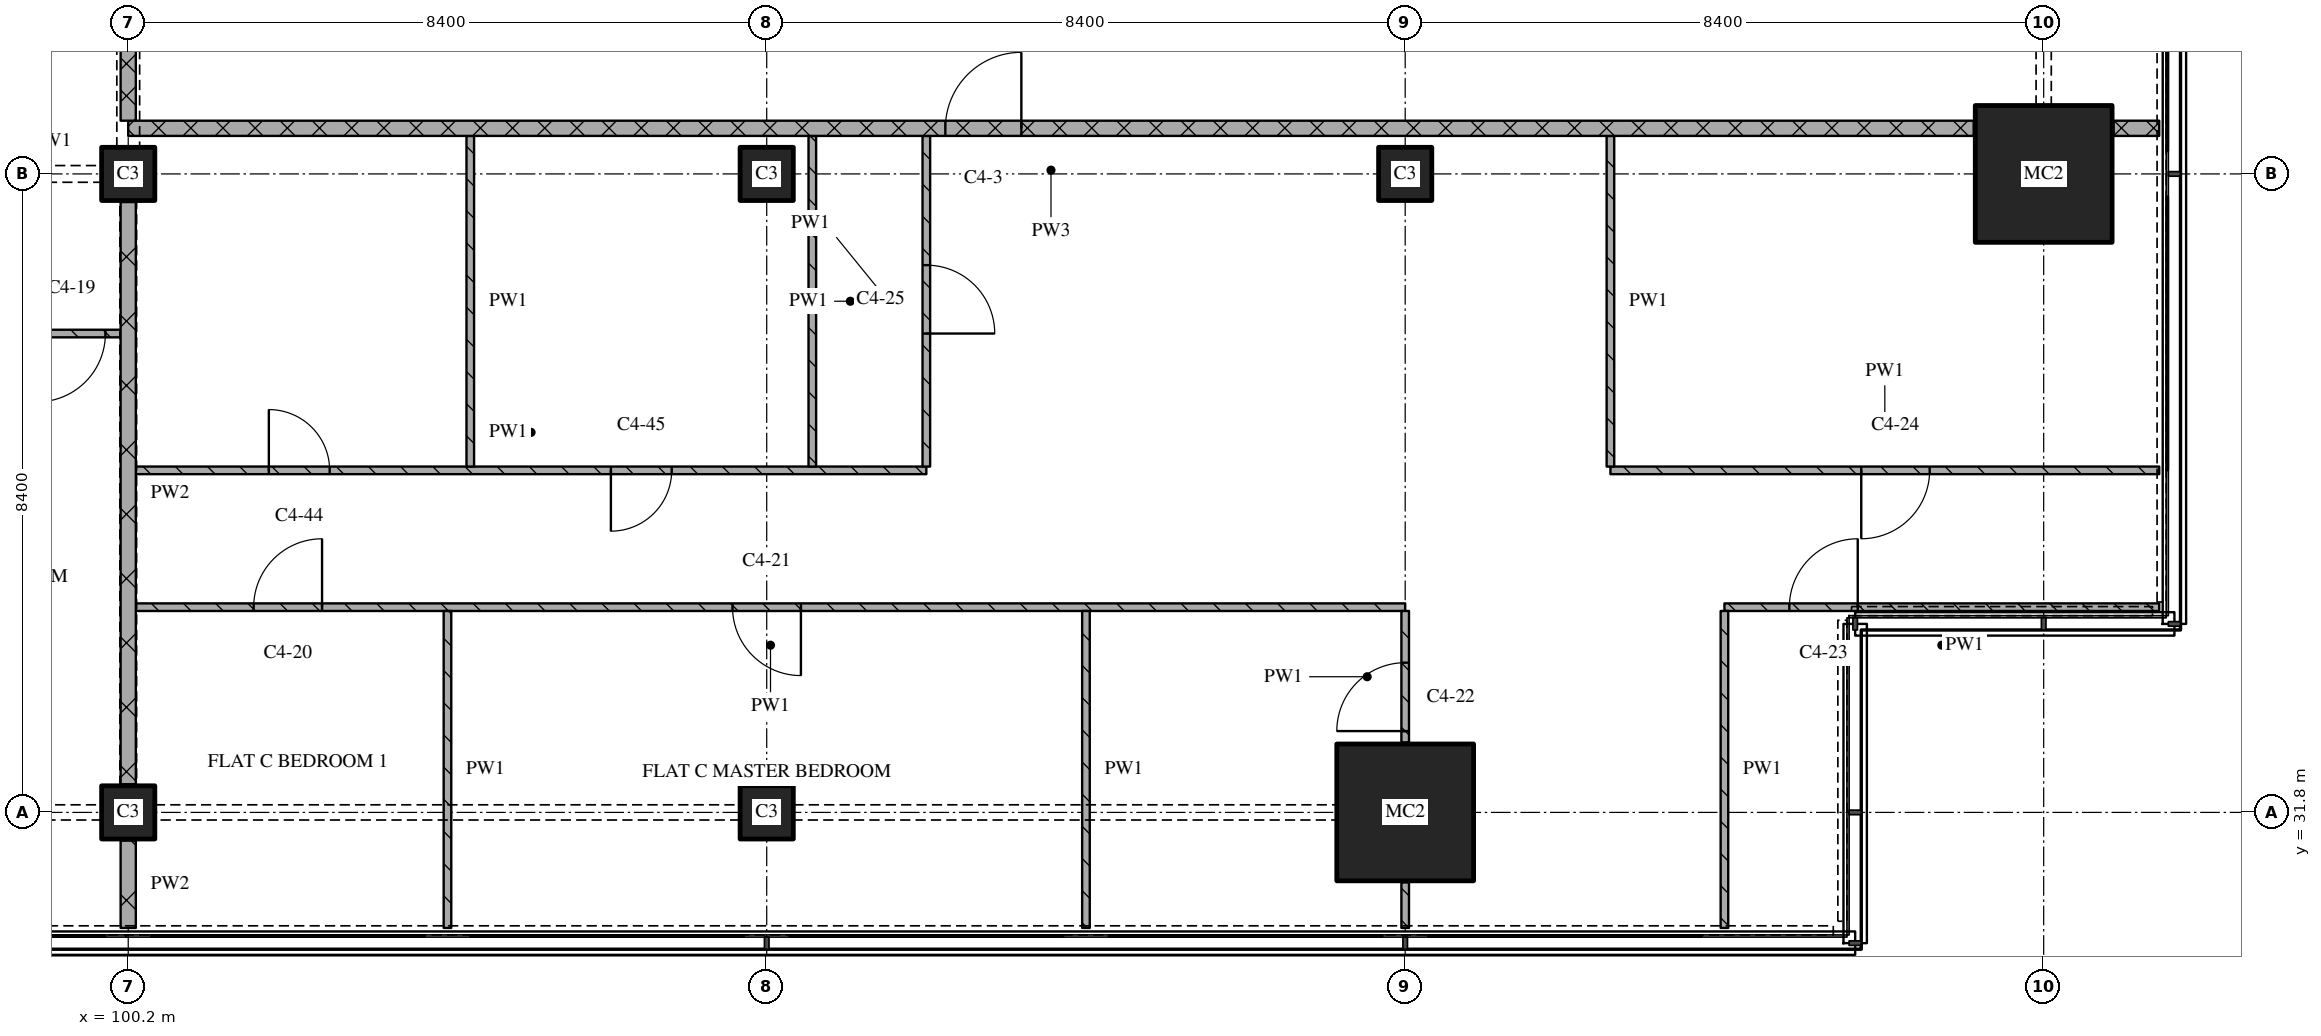
"""IFC4 building model, lengths in metres.
Left out: names, types, materials, properties, quantities, classifications, styles, units other than length and angle.
Written with IfcOpenShell. Run it as: python <this file> out.ifc"""

import sys

from ifc_helpers import new_model, si_unit, direction, frame, frame_2d, origin, origin_2d, place, context, subcontext, project, spatial, rectangle, extrude, element, fill, save


model = new_model("IFC4")
c1 = context("Model", 3, precision=1e-05, world=origin(), true_north=direction((0.0, 1.0)))
c2 = subcontext(c1, "Body", "Model", "MODEL_VIEW")
j1 = project(units=[si_unit("LENGTHUNIT", "METRE"), si_unit("PLANEANGLEUNIT", "RADIAN")], contexts=[c1])
p1 = place(None, origin())
s1 = spatial("IfcSite", under=j1, at=p1, CompositionType="ELEMENT")
p2 = place(p1, origin())
s2 = spatial("IfcBuilding", under=s1, at=p2, CompositionType="ELEMENT")
p3 = place(p2, frame((0.0, 0.0, 187.05)))
s3 = spatial("IfcBuildingStorey", under=s2, at=p3, CompositionType="ELEMENT", Elevation=187.05)
for number, where, z_axis, x_axis in (
    (1, (100.2, 31.8, 0.0), (0.0, 0.0, 1.0), (1.0, 0.0, 0.0)),
    (2, (100.2, 40.2, 0.0), (0.0, 0.0, 1.0), (1.0, 0.0, 0.0)),
    (3, (108.6, 31.8, 0.0), (0.0, 0.0, 1.0), (1.0, 0.0, 0.0)),
    (4, (108.6, 40.2, 0.0), (0.0, 0.0, 1.0), (1.0, 0.0, 0.0)),
):
    element("IfcColumn", number, at=place(p3, frame(where, z_axis=z_axis, x_axis=x_axis)), inside=s3, PredefinedType="COLUMN", context=c2, shape_type="SweptSolid", body=[
        extrude(rectangle(XDim=0.7, YDim=0.7, at=origin_2d()), origin(), (0.0, 0.0, 1.0), 3.6),
    ])
p4 = place(p3, frame((117.0, 31.8, 0.0), z_axis=(0.0, 0.0, 1.0), x_axis=(1.0, 0.0, 0.0)))
e5 = element("IfcColumn", 5, at=p4, inside=s3, PredefinedType="COLUMN", context=c2, shape_type="SweptSolid", body=[
    extrude(rectangle(XDim=1.8, YDim=1.8, at=origin_2d()), origin(), (0.0, 0.0, 1.0), 3.6),
])
p5 = place(p3, frame((117.0, 40.2, 0.0), z_axis=(0.0, 0.0, 1.0), x_axis=(1.0, 0.0, 0.0)))
e6 = element("IfcColumn", 6, at=p5, inside=s3, PredefinedType="COLUMN", context=c2, shape_type="SweptSolid", body=[
    extrude(rectangle(XDim=0.7, YDim=0.7, at=origin_2d()), origin(), (0.0, 0.0, 1.0), 3.6),
])
p6 = place(p3, frame((125.4, 40.2, 0.0), z_axis=(0.0, 0.0, 1.0), x_axis=(1.0, 0.0, 0.0)))
e7 = element("IfcColumn", 7, at=p6, inside=s3, PredefinedType="COLUMN", context=c2, shape_type="SweptSolid", body=[
    extrude(rectangle(XDim=1.8, YDim=1.8, at=origin_2d()), origin(), (0.0, 0.0, 1.0), 3.6),
])
p7 = place(p3, frame((117.0, 34.5, 0.0), z_axis=(0.0, 0.0, 1.0), x_axis=(-1.0, 0.0, 0.0)))
e8 = element("IfcWall", 8, at=p7, inside=s3, PredefinedType="PARTITIONING", context=c2, shape_type="SweptSolid", body=[
    extrude(rectangle(XDim=16.7, YDim=0.1, at=frame_2d((8.35, 0.0))), origin(), (0.0, 0.0, 1.0), 3.32),
])
p8 = place(p7, frame((7.95, 0.0, 0.0)))
e9 = element("IfcOpeningElement", 9, at=p8, cuts=e8, PredefinedType="OPENING", context=c2, shape_type="SweptSolid", body=[
    extrude(rectangle(XDim=0.9, YDim=2.1, at=frame_2d((0.45, 1.05))), frame((0.0, 0.06, 0.0), z_axis=(0.0, -1.0, 0.0), x_axis=(1.0, 0.0, 0.0)), (0.0, 0.0, 1.0), 0.12),
])
p9 = place(p7, frame((14.25, 0.0, 0.0)))
e10 = element("IfcOpeningElement", 10, at=p9, cuts=e8, PredefinedType="OPENING", context=c2, shape_type="SweptSolid", body=[
    extrude(rectangle(XDim=0.9, YDim=2.1, at=frame_2d((0.45, 1.05))), frame((0.0, 0.06, 0.0), z_axis=(0.0, -1.0, 0.0), x_axis=(1.0, 0.0, 0.0)), (0.0, 0.0, 1.0), 0.12),
])
p10 = place(p3, frame((126.92, 34.5, 0.0), z_axis=(0.0, 0.0, 1.0), x_axis=(-1.0, 0.0, 0.0)))
e11 = element("IfcWall", 11, at=p10, inside=s3, PredefinedType="PARTITIONING", context=c2, shape_type="SweptSolid", body=[
    extrude(rectangle(XDim=5.72, YDim=0.1, at=frame_2d((2.86, 0.0))), origin(), (0.0, 0.0, 1.0), 3.32),
])
p11 = place(p10, frame((3.966, 0.0, 0.0)))
e12 = element("IfcOpeningElement", 12, at=p11, cuts=e11, PredefinedType="OPENING", context=c2, shape_type="SweptSolid", body=[
    extrude(rectangle(XDim=0.9, YDim=2.1, at=frame_2d((0.45, 1.05))), frame((0.0, 0.06, 0.0), z_axis=(0.0, -1.0, 0.0), x_axis=(1.0, 0.0, 0.0)), (0.0, 0.0, 1.0), 0.12),
])
p12 = place(p3, frame((100.3, 36.3, 0.0), z_axis=(0.0, 0.0, 1.0), x_axis=(1.0, 0.0, 0.0)))
e13 = element("IfcWall", 13, at=p12, inside=s3, PredefinedType="PARTITIONING", context=c2, shape_type="SweptSolid", body=[
    extrude(rectangle(XDim=10.4, YDim=0.1, at=frame_2d((5.2, 0.0))), origin(), (0.0, 0.0, 1.0), 3.32),
])
p13 = place(p12, frame((1.75, 0.0, 0.0)))
e14 = element("IfcOpeningElement", 14, at=p13, cuts=e13, PredefinedType="OPENING", context=c2, shape_type="SweptSolid", body=[
    extrude(rectangle(XDim=0.8, YDim=2.1, at=frame_2d((0.4, 1.05))), frame((0.0, 0.06, 0.0), z_axis=(0.0, -1.0, 0.0), x_axis=(1.0, 0.0, 0.0)), (0.0, 0.0, 1.0), 0.12),
])
p14 = place(p12, frame((6.25, 0.0, 0.0)))
e15 = element("IfcOpeningElement", 15, at=p14, cuts=e13, PredefinedType="OPENING", context=c2, shape_type="SweptSolid", body=[
    extrude(rectangle(XDim=0.8, YDim=2.1, at=frame_2d((0.4, 1.05))), frame((0.0, 0.06, 0.0), z_axis=(0.0, -1.0, 0.0), x_axis=(1.0, 0.0, 0.0)), (0.0, 0.0, 1.0), 0.12),
])
p15 = place(p3, frame((119.7, 36.3, 0.0), z_axis=(0.0, 0.0, 1.0), x_axis=(1.0, 0.0, 0.0)))
e16 = element("IfcWall", 16, at=p15, inside=s3, PredefinedType="PARTITIONING", context=c2, shape_type="SweptSolid", body=[
    extrude(rectangle(XDim=7.22, YDim=0.1, at=frame_2d((3.61, 0.0))), origin(), (0.0, 0.0, 1.0), 3.32),
])
p16 = place(p15, frame((3.3, 0.0, 0.0)))
e17 = element("IfcOpeningElement", 17, at=p16, cuts=e16, PredefinedType="OPENING", context=c2, shape_type="SweptSolid", body=[
    extrude(rectangle(XDim=0.9, YDim=2.1, at=frame_2d((0.45, 1.05))), frame((0.0, 0.06, 0.0), z_axis=(0.0, -1.0, 0.0), x_axis=(1.0, 0.0, 0.0)), (0.0, 0.0, 1.0), 0.12),
])
p17 = place(p3, frame((89.7, 38.1, 0.0), z_axis=(0.0, 0.0, 1.0), x_axis=(1.0, 0.0, 0.0)))
e18 = element("IfcWall", 18, at=p17, inside=s3, PredefinedType="PARTITIONING", context=c2, shape_type="SweptSolid", body=[
    extrude(rectangle(XDim=10.4, YDim=0.1, at=frame_2d((5.2, 0.0))), origin(), (0.0, 0.0, 1.0), 3.32),
])
p18 = place(p17, frame((6.35, 0.0, 0.0)))
e19 = element("IfcOpeningElement", 19, at=p18, cuts=e18, PredefinedType="OPENING", context=c2, shape_type="SweptSolid", body=[
    extrude(rectangle(XDim=0.8, YDim=2.1, at=frame_2d((0.4, 1.05))), frame((0.0, 0.06, 0.0), z_axis=(0.0, -1.0, 0.0), x_axis=(1.0, 0.0, 0.0)), (0.0, 0.0, 1.0), 0.12),
])
p19 = place(p17, frame((9.3, 0.0, 0.0)))
e20 = element("IfcOpeningElement", 20, at=p19, cuts=e18, PredefinedType="OPENING", context=c2, shape_type="SweptSolid", body=[
    extrude(rectangle(XDim=0.9, YDim=2.1, at=frame_2d((0.45, 1.05))), frame((0.0, 0.06, 0.0), z_axis=(0.0, -1.0, 0.0), x_axis=(1.0, 0.0, 0.0)), (0.0, 0.0, 1.0), 0.12),
])
p20 = place(p3, frame((124.48, 40.8, 0.0), z_axis=(0.0, 0.0, 1.0), x_axis=(-1.0, 0.0, 0.0)))
e21 = element("IfcWall", 21, at=p20, inside=s3, PredefinedType="PARTITIONING", context=c2, shape_type="SweptSolid", body=[
    extrude(rectangle(XDim=24.28, YDim=0.2, at=frame_2d((12.14, 0.0))), origin(), (0.0, 0.0, 1.0), 3.32),
])
p21 = place(p20, frame((12.53, 0.0, 0.0)))
e22 = element("IfcOpeningElement", 22, at=p21, cuts=e21, PredefinedType="OPENING", context=c2, shape_type="SweptSolid", body=[
    extrude(rectangle(XDim=1.0, YDim=2.1, at=frame_2d((0.5, 1.05))), frame((0.0, 0.11, 0.0), z_axis=(0.0, -1.0, 0.0), x_axis=(1.0, 0.0, 0.0)), (0.0, 0.0, 1.0), 0.22),
])
p22 = place(p3, frame((126.32, 40.8, 0.0), z_axis=(0.0, 0.0, 1.0), x_axis=(1.0, 0.0, 0.0)))
e23 = element("IfcWall", 23, at=p22, inside=s3, PredefinedType="PARTITIONING", context=c2, shape_type="SweptSolid", body=[
    extrude(rectangle(XDim=0.6, YDim=0.2, at=frame_2d((0.3, 0.0))), origin(), (0.0, 0.0, 1.0), 3.32),
])
p23 = place(p3, frame((100.2, 43.1, 0.0), z_axis=(0.0, 0.0, 1.0), x_axis=(0.0, -1.0, 0.0)))
e24 = element("IfcWall", 24, at=p23, inside=s3, PredefinedType="PARTITIONING", context=c2, shape_type="SweptSolid", body=[
    extrude(rectangle(XDim=2.2, YDim=0.2, at=frame_2d((1.1, 0.0))), origin(), (0.0, 0.0, 1.0), 2.43),
])
p24 = place(p3, frame((100.2, 31.43, 0.0), z_axis=(0.0, 0.0, 1.0), x_axis=(0.0, -1.0, 0.0)))
e25 = element("IfcWall", 25, at=p24, inside=s3, PredefinedType="PARTITIONING", context=c2, shape_type="SweptSolid", body=[
    extrude(rectangle(XDim=1.15, YDim=0.2, at=frame_2d((0.575, 0.0))), origin(), (0.0, 0.0, 1.0), 3.32),
])
p25 = place(p3, frame((100.2, 39.83, 0.0), z_axis=(0.0, 0.0, 1.0), x_axis=(0.0, -1.0, 0.0)))
e26 = element("IfcWall", 26, at=p25, inside=s3, PredefinedType="PARTITIONING", context=c2, shape_type="SweptSolid", body=[
    extrude(rectangle(XDim=7.66, YDim=0.2, at=frame_2d((3.83, 0.0))), origin(), (0.0, 0.0, 1.0), 2.72),
])
p26 = place(p3, frame((104.4, 34.45, 0.0), z_axis=(0.0, 0.0, 1.0), x_axis=(0.0, -1.0, 0.0)))
e27 = element("IfcWall", 27, at=p26, inside=s3, PredefinedType="PARTITIONING", context=c2, shape_type="SweptSolid", body=[
    extrude(rectangle(XDim=4.17, YDim=0.1, at=frame_2d((2.085, 0.0))), origin(), (0.0, 0.0, 1.0), 3.32),
])
for number, where, z_axis, x_axis in (
    (28, (104.7, 40.7, 0.0), (0.0, 0.0, 1.0), (0.0, -1.0, 0.0)),
    (29, (109.2, 40.7, 0.0), (0.0, 0.0, 1.0), (0.0, -1.0, 0.0)),
):
    element("IfcWall", number, at=place(p3, frame(where, z_axis=z_axis, x_axis=x_axis)), inside=s3, PredefinedType="PARTITIONING", context=c2, shape_type="SweptSolid", body=[
        extrude(rectangle(XDim=4.35, YDim=0.1, at=frame_2d((2.175, 0.0))), origin(), (0.0, 0.0, 1.0), 3.32),
    ])
p27 = place(p3, frame((110.7, 36.35, 0.0), z_axis=(0.0, 0.0, 1.0), x_axis=(0.0, 1.0, 0.0)))
e30 = element("IfcWall", 30, at=p27, inside=s3, PredefinedType="PARTITIONING", context=c2, shape_type="SweptSolid", body=[
    extrude(rectangle(XDim=4.35, YDim=0.1, at=frame_2d((2.175, 0.0))), origin(), (0.0, 0.0, 1.0), 3.32),
])
p28 = place(p27, frame((1.75, 0.0, 0.0)))
e31 = element("IfcOpeningElement", 31, at=p28, cuts=e30, PredefinedType="OPENING", context=c2, shape_type="SweptSolid", body=[
    extrude(rectangle(XDim=0.9, YDim=2.1, at=frame_2d((0.45, 1.05))), frame((0.0, 0.06, 0.0), z_axis=(0.0, -1.0, 0.0), x_axis=(1.0, 0.0, 0.0)), (0.0, 0.0, 1.0), 0.12),
])
p29 = place(p3, frame((112.8, 34.45, 0.0), z_axis=(0.0, 0.0, 1.0), x_axis=(0.0, -1.0, 0.0)))
e32 = element("IfcWall", 32, at=p29, inside=s3, PredefinedType="PARTITIONING", context=c2, shape_type="SweptSolid", body=[
    extrude(rectangle(XDim=4.17, YDim=0.1, at=frame_2d((2.085, 0.0))), origin(), (0.0, 0.0, 1.0), 3.32),
])
p30 = place(p3, frame((117.0, 30.88, 0.0), z_axis=(0.0, 0.0, 1.0), x_axis=(0.0, -1.0, 0.0)))
e33 = element("IfcWall", 33, at=p30, inside=s3, PredefinedType="PARTITIONING", context=c2, shape_type="SweptSolid", body=[
    extrude(rectangle(XDim=0.6, YDim=0.1, at=frame_2d((0.3, 0.0))), origin(), (0.0, 0.0, 1.0), 3.32),
])
p31 = place(p3, frame((117.0, 32.72, 0.0), z_axis=(0.0, 0.0, 1.0), x_axis=(0.0, 1.0, 0.0)))
e34 = element("IfcWall", 34, at=p31, inside=s3, PredefinedType="PARTITIONING", context=c2, shape_type="SweptSolid", body=[
    extrude(rectangle(XDim=1.73, YDim=0.1, at=frame_2d((0.865, 0.0))), origin(), (0.0, 0.0, 1.0), 3.32),
])
p32 = place(p31, frame((0.15, 0.0, 0.0)))
e35 = element("IfcOpeningElement", 35, at=p32, cuts=e34, PredefinedType="OPENING", context=c2, shape_type="SweptSolid", body=[
    extrude(rectangle(XDim=0.9, YDim=2.1, at=frame_2d((0.45, 1.05))), frame((0.0, 0.06, 0.0), z_axis=(0.0, -1.0, 0.0), x_axis=(1.0, 0.0, 0.0)), (0.0, 0.0, 1.0), 0.12),
])
p33 = place(p3, frame((119.7, 40.7, 0.0), z_axis=(0.0, 0.0, 1.0), x_axis=(0.0, -1.0, 0.0)))
e36 = element("IfcWall", 36, at=p33, inside=s3, PredefinedType="PARTITIONING", context=c2, shape_type="SweptSolid", body=[
    extrude(rectangle(XDim=4.35, YDim=0.1, at=frame_2d((2.175, 0.0))), origin(), (0.0, 0.0, 1.0), 3.32),
])
p34 = place(p3, frame((121.2, 34.45, 0.0), z_axis=(0.0, 0.0, 1.0), x_axis=(0.0, -1.0, 0.0)))
e37 = element("IfcWall", 37, at=p34, inside=s3, PredefinedType="PARTITIONING", context=c2, shape_type="SweptSolid", body=[
    extrude(rectangle(XDim=4.17, YDim=0.1, at=frame_2d((2.085, 0.0))), origin(), (0.0, 0.0, 1.0), 3.32),
])
p35 = place(p8, origin())
e38 = element("IfcDoor", 38, at=p35, inside=s3, OperationType="SINGLE_SWING_LEFT", PredefinedType="DOOR", context=c2, shape_type="SweptSolid", body=[
    extrude(rectangle(XDim=0.9, YDim=2.1, at=frame_2d((0.45, 1.05))), frame((0.0, 0.025, 0.0), z_axis=(0.0, -1.0, 0.0), x_axis=(1.0, 0.0, 0.0)), (0.0, 0.0, 1.0), 0.05),
])
fill(e9, e38)
p36 = place(p9, origin())
e39 = element("IfcDoor", 39, at=p36, inside=s3, OperationType="SINGLE_SWING_RIGHT", PredefinedType="DOOR", context=c2, shape_type="SweptSolid", body=[
    extrude(rectangle(XDim=0.9, YDim=2.1, at=frame_2d((0.45, 1.05))), frame((0.0, 0.025, 0.0), z_axis=(0.0, -1.0, 0.0), x_axis=(1.0, 0.0, 0.0)), (0.0, 0.0, 1.0), 0.05),
])
fill(e10, e39)
p37 = place(p11, origin())
e40 = element("IfcDoor", 40, at=p37, inside=s3, OperationType="SINGLE_SWING_RIGHT", PredefinedType="DOOR", context=c2, shape_type="SweptSolid", body=[
    extrude(rectangle(XDim=0.9, YDim=2.1, at=frame_2d((0.45, 1.05))), frame((0.0, 0.025, 0.0), z_axis=(0.0, -1.0, 0.0), x_axis=(1.0, 0.0, 0.0)), (0.0, 0.0, 1.0), 0.05),
])
fill(e12, e40)
p38 = place(p13, origin())
e41 = element("IfcDoor", 41, at=p38, inside=s3, OperationType="SINGLE_SWING_LEFT", PredefinedType="DOOR", context=c2, shape_type="SweptSolid", body=[
    extrude(rectangle(XDim=0.8, YDim=2.1, at=frame_2d((0.4, 1.05))), frame((0.0, 0.025, 0.0), z_axis=(0.0, -1.0, 0.0), x_axis=(1.0, 0.0, 0.0)), (0.0, 0.0, 1.0), 0.05),
])
fill(e14, e41)
p39 = place(p14, origin())
e42 = element("IfcDoor", 42, at=p39, inside=s3, OperationType="SINGLE_SWING_RIGHT", PredefinedType="DOOR", context=c2, shape_type="SweptSolid", body=[
    extrude(rectangle(XDim=0.8, YDim=2.1, at=frame_2d((0.4, 1.05))), frame((0.0, 0.025, 0.0), z_axis=(0.0, -1.0, 0.0), x_axis=(1.0, 0.0, 0.0)), (0.0, 0.0, 1.0), 0.05),
])
fill(e15, e42)
p40 = place(p16, origin())
e43 = element("IfcDoor", 43, at=p40, inside=s3, OperationType="SINGLE_SWING_RIGHT", PredefinedType="DOOR", context=c2, shape_type="SweptSolid", body=[
    extrude(rectangle(XDim=0.9, YDim=2.1, at=frame_2d((0.45, 1.05))), frame((0.0, 0.025, 0.0), z_axis=(0.0, -1.0, 0.0), x_axis=(1.0, 0.0, 0.0)), (0.0, 0.0, 1.0), 0.05),
])
fill(e17, e43)
p41 = place(p19, origin())
e44 = element("IfcDoor", 44, at=p41, inside=s3, OperationType="SINGLE_SWING_RIGHT", PredefinedType="DOOR", context=c2, shape_type="SweptSolid", body=[
    extrude(rectangle(XDim=0.9, YDim=2.1, at=frame_2d((0.45, 1.05))), frame((0.0, 0.025, 0.0), z_axis=(0.0, -1.0, 0.0), x_axis=(1.0, 0.0, 0.0)), (0.0, 0.0, 1.0), 0.05),
])
fill(e20, e44)
p42 = place(p21, origin())
e45 = element("IfcDoor", 45, at=p42, inside=s3, OperationType="SINGLE_SWING_RIGHT", PredefinedType="DOOR", context=c2, shape_type="SweptSolid", body=[
    extrude(rectangle(XDim=1.0, YDim=2.1, at=frame_2d((0.5, 1.05))), frame((0.0, 0.025, 0.0), z_axis=(0.0, -1.0, 0.0), x_axis=(1.0, 0.0, 0.0)), (0.0, 0.0, 1.0), 0.05),
])
fill(e22, e45)
p43 = place(p28, origin())
e46 = element("IfcDoor", 46, at=p43, inside=s3, OperationType="SINGLE_SWING_RIGHT", PredefinedType="DOOR", context=c2, shape_type="SweptSolid", body=[
    extrude(rectangle(XDim=0.9, YDim=2.1, at=frame_2d((0.45, 1.05))), frame((0.0, 0.025, 0.0), z_axis=(0.0, -1.0, 0.0), x_axis=(1.0, 0.0, 0.0)), (0.0, 0.0, 1.0), 0.05),
])
fill(e31, e46)
p44 = place(p32, origin())
e47 = element("IfcDoor", 47, at=p44, inside=s3, OperationType="SINGLE_SWING_LEFT", PredefinedType="DOOR", context=c2, shape_type="SweptSolid", body=[
    extrude(rectangle(XDim=0.9, YDim=2.1, at=frame_2d((0.45, 1.05))), frame((0.0, 0.025, 0.0), z_axis=(0.0, -1.0, 0.0), x_axis=(1.0, 0.0, 0.0)), (0.0, 0.0, 1.0), 0.05),
])
fill(e35, e47)
save(model, sys.argv[1])
